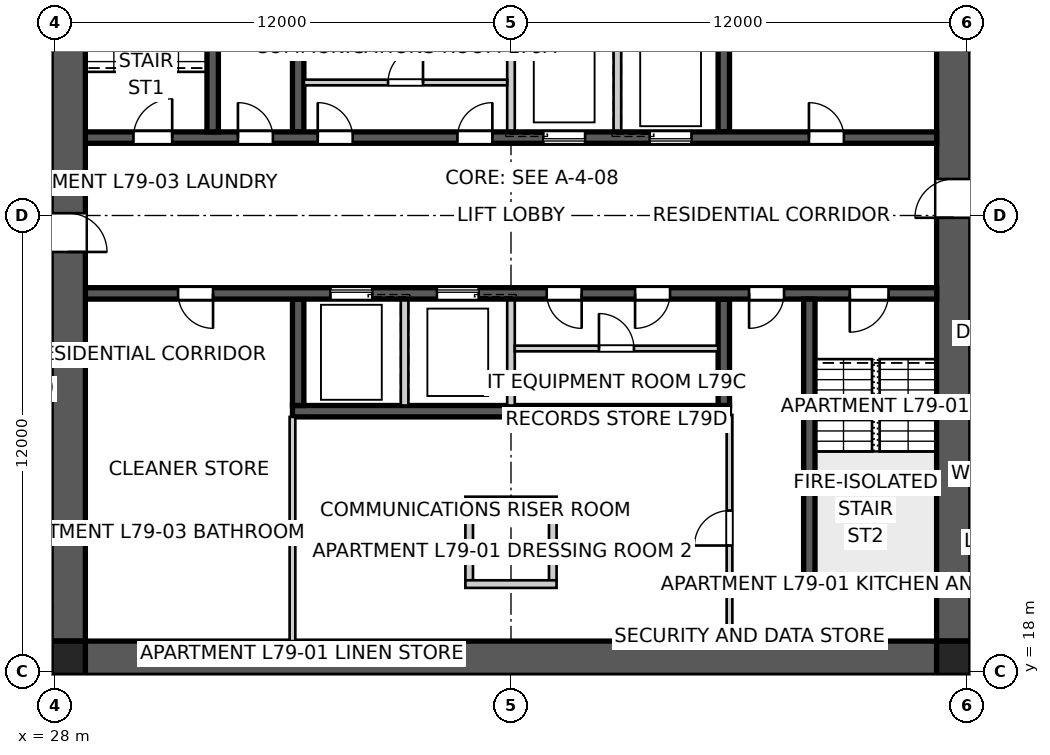
"""IFC4 building model, lengths in metres.
Left out: names, types, materials, properties, quantities, classifications, styles, units other than length and angle.
Written with IfcOpenShell. Run it as: python <this file> out.ifc"""

import sys

from ifc_helpers import new_model, si_unit, direction, frame, frame_2d, origin, origin_2d, place, context, subcontext, project, spatial, polyline, rectangle, outline, extrude, element, fill, save


model = new_model("IFC4")
c1 = context("Model", 3, precision=1e-05, world=origin(), true_north=direction((0.0, 1.0)))
c2 = subcontext(c1, "Body", "Model", "MODEL_VIEW")
j1 = project(units=[si_unit("LENGTHUNIT", "METRE"), si_unit("PLANEANGLEUNIT", "RADIAN")], contexts=[c1])
p1 = place(None, origin())
s1 = spatial("IfcSite", under=j1, at=p1, CompositionType="ELEMENT")
p2 = place(p1, origin())
s2 = spatial("IfcBuilding", under=s1, at=p2, CompositionType="ELEMENT")
p3 = place(p2, frame((0.0, 0.0, 286.2)))
s3 = spatial("IfcBuildingStorey", under=s2, at=p3, CompositionType="ELEMENT", Elevation=286.2)
p4 = place(p3, frame((51.2, 18.35, 0.0), z_axis=(0.0, 0.0, 1.0), x_axis=(-1.0, 0.0, 0.0)))
e1 = element("IfcWall", 1, at=p4, inside=s3, PredefinedType="SHEAR", context=c2, shape_type="SweptSolid", body=[
    extrude(outline(polyline([(0.0, -0.45), (22.4, -0.45), (22.4, -0.025), (22.85, -0.025), (22.85, 0.025), (22.4, 0.025), (22.4, 0.45), (0.0, 0.45), (0.0, 0.025), (-0.45, 0.025), (-0.45, -0.025), (0.0, -0.025), (0.0, -0.45)])), origin(), (0.0, 0.0, 1.0), 3.4),
])
p5 = place(p3, frame((51.65, 18.8, 0.0), z_axis=(0.0, 0.0, 1.0), x_axis=(0.0, 1.0, 0.0)))
e2 = element("IfcWall", 2, at=p5, inside=s3, PredefinedType="SHEAR", context=c2, shape_type="SweptSolid", body=[
    extrude(outline(polyline([(0.0, -0.45), (22.4, -0.45), (22.4, -0.025), (22.85, -0.025), (22.85, 0.025), (22.4, 0.025), (22.4, 0.45), (0.0, 0.45), (0.0, 0.025), (-0.45, 0.025), (-0.45, -0.025), (0.0, -0.025), (0.0, -0.45)])), origin(), (0.0, 0.0, 1.0), 3.4),
])
p6 = place(p5, frame((11.14, 0.0, 0.0)))
e3 = element("IfcOpeningElement", 3, at=p6, cuts=e2, PredefinedType="OPENING", context=c2, shape_type="SweptSolid", body=[
    extrude(rectangle(XDim=1.02, YDim=2.4, at=frame_2d((0.51, 1.2))), frame((0.0, 0.46, 0.0), z_axis=(0.0, -1.0, 0.0), x_axis=(1.0, 0.0, 0.0)), (0.0, 0.0, 1.0), 0.92),
])
p7 = place(p3, frame((28.35, 41.2, 0.0), z_axis=(0.0, 0.0, 1.0), x_axis=(0.0, -1.0, 0.0)))
e4 = element("IfcWall", 4, at=p7, inside=s3, PredefinedType="SHEAR", context=c2, shape_type="SweptSolid", body=[
    extrude(outline(polyline([(0.0, -0.45), (22.4, -0.45), (22.4, -0.025), (22.85, -0.025), (22.85, 0.025), (22.4, 0.025), (22.4, 0.45), (0.0, 0.45), (0.0, 0.025), (-0.45, 0.025), (-0.45, -0.025), (0.0, -0.025), (0.0, -0.45)])), origin(), (0.0, 0.0, 1.0), 3.4),
])
p8 = place(p7, frame((11.14, 0.0, 0.0)))
e5 = element("IfcOpeningElement", 5, at=p8, cuts=e4, PredefinedType="OPENING", context=c2, shape_type="SweptSolid", body=[
    extrude(rectangle(XDim=1.02, YDim=2.4, at=frame_2d((0.51, 1.2))), frame((0.0, 0.46, 0.0), z_axis=(0.0, -1.0, 0.0), x_axis=(1.0, 0.0, 0.0)), (0.0, 0.0, 1.0), 0.92),
])
p9 = place(p3, frame((28.8, 32.05, 0.0), z_axis=(0.0, 0.0, 1.0), x_axis=(1.0, 0.0, 0.0)))
e6 = element("IfcWall", 6, at=p9, inside=s3, PredefinedType="SHEAR", context=c2, shape_type="SweptSolid", body=[
    extrude(rectangle(XDim=22.4, YDim=0.3, at=frame_2d((11.2, 0.0))), origin(), (0.0, 0.0, 1.0), 3.4),
])
p10 = place(p9, frame((19.04, 0.0, 0.0)))
e7 = element("IfcOpeningElement", 7, at=p10, cuts=e6, PredefinedType="OPENING", context=c2, shape_type="SweptSolid", body=[
    extrude(rectangle(XDim=0.92, YDim=2.1, at=frame_2d((0.46, 1.05))), frame((0.0, 0.16, 0.0), z_axis=(0.0, -1.0, 0.0), x_axis=(1.0, 0.0, 0.0)), (0.0, 0.0, 1.0), 0.32),
])
p11 = place(p9, frame((1.265, 0.0, 0.0)))
e8 = element("IfcOpeningElement", 8, at=p11, cuts=e6, PredefinedType="OPENING", context=c2, shape_type="SweptSolid", body=[
    extrude(rectangle(XDim=1.02, YDim=2.1, at=frame_2d((0.51, 1.05))), frame((0.0, 0.16, 0.0), z_axis=(0.0, -1.0, 0.0), x_axis=(1.0, 0.0, 0.0)), (0.0, 0.0, 1.0), 0.32),
])
p12 = place(p9, frame((4.015, 0.0, 0.0)))
e9 = element("IfcOpeningElement", 9, at=p12, cuts=e6, PredefinedType="OPENING", context=c2, shape_type="SweptSolid", body=[
    extrude(rectangle(XDim=0.92, YDim=2.1, at=frame_2d((0.46, 1.05))), frame((0.0, 0.16, 0.0), z_axis=(0.0, -1.0, 0.0), x_axis=(1.0, 0.0, 0.0)), (0.0, 0.0, 1.0), 0.32),
])
p13 = place(p9, frame((6.115, 0.0, 0.0)))
e10 = element("IfcOpeningElement", 10, at=p13, cuts=e6, PredefinedType="OPENING", context=c2, shape_type="SweptSolid", body=[
    extrude(rectangle(XDim=0.92, YDim=2.1, at=frame_2d((0.46, 1.05))), frame((0.0, 0.16, 0.0), z_axis=(0.0, -1.0, 0.0), x_axis=(1.0, 0.0, 0.0)), (0.0, 0.0, 1.0), 0.32),
])
p14 = place(p9, frame((9.79, 0.0, 0.0)))
e11 = element("IfcOpeningElement", 11, at=p14, cuts=e6, PredefinedType="OPENING", context=c2, shape_type="SweptSolid", body=[
    extrude(rectangle(XDim=0.92, YDim=2.1, at=frame_2d((0.46, 1.05))), frame((0.0, 0.16, 0.0), z_axis=(0.0, -1.0, 0.0), x_axis=(1.0, 0.0, 0.0)), (0.0, 0.0, 1.0), 0.32),
])
p15 = place(p9, frame((12.05, 0.0, 0.0)))
e12 = element("IfcOpeningElement", 12, at=p15, cuts=e6, PredefinedType="OPENING", context=c2, shape_type="SweptSolid", body=[
    extrude(rectangle(XDim=1.1, YDim=2.1, at=frame_2d((0.55, 1.05))), frame((0.0, 0.16, 0.0), z_axis=(0.0, -1.0, 0.0), x_axis=(1.0, 0.0, 0.0)), (0.0, 0.0, 1.0), 0.32),
])
p16 = place(p9, frame((14.85, 0.0, 0.0)))
e13 = element("IfcOpeningElement", 13, at=p16, cuts=e6, PredefinedType="OPENING", context=c2, shape_type="SweptSolid", body=[
    extrude(rectangle(XDim=1.1, YDim=2.1, at=frame_2d((0.55, 1.05))), frame((0.0, 0.16, 0.0), z_axis=(0.0, -1.0, 0.0), x_axis=(1.0, 0.0, 0.0)), (0.0, 0.0, 1.0), 0.32),
])
p17 = place(p3, frame((51.2, 27.95, 0.0), z_axis=(0.0, 0.0, 1.0), x_axis=(-1.0, 0.0, 0.0)))
e14 = element("IfcWall", 14, at=p17, inside=s3, PredefinedType="SHEAR", context=c2, shape_type="SweptSolid", body=[
    extrude(rectangle(XDim=22.4, YDim=0.3, at=frame_2d((11.2, 0.0))), origin(), (0.0, 0.0, 1.0), 3.4),
])
p18 = place(p17, frame((19.04, 0.0, 0.0)))
e15 = element("IfcOpeningElement", 15, at=p18, cuts=e14, PredefinedType="OPENING", context=c2, shape_type="SweptSolid", body=[
    extrude(rectangle(XDim=0.92, YDim=2.1, at=frame_2d((0.46, 1.05))), frame((0.0, 0.16, 0.0), z_axis=(0.0, -1.0, 0.0), x_axis=(1.0, 0.0, 0.0)), (0.0, 0.0, 1.0), 0.32),
])
p19 = place(p17, frame((1.265, 0.0, 0.0)))
e16 = element("IfcOpeningElement", 16, at=p19, cuts=e14, PredefinedType="OPENING", context=c2, shape_type="SweptSolid", body=[
    extrude(rectangle(XDim=1.02, YDim=2.1, at=frame_2d((0.51, 1.05))), frame((0.0, 0.16, 0.0), z_axis=(0.0, -1.0, 0.0), x_axis=(1.0, 0.0, 0.0)), (0.0, 0.0, 1.0), 0.32),
])
p20 = place(p17, frame((4.015, 0.0, 0.0)))
e17 = element("IfcOpeningElement", 17, at=p20, cuts=e14, PredefinedType="OPENING", context=c2, shape_type="SweptSolid", body=[
    extrude(rectangle(XDim=0.92, YDim=2.1, at=frame_2d((0.46, 1.05))), frame((0.0, 0.16, 0.0), z_axis=(0.0, -1.0, 0.0), x_axis=(1.0, 0.0, 0.0)), (0.0, 0.0, 1.0), 0.32),
])
p21 = place(p17, frame((9.34, 0.0, 0.0)))
e18 = element("IfcOpeningElement", 18, at=p21, cuts=e14, PredefinedType="OPENING", context=c2, shape_type="SweptSolid", body=[
    extrude(rectangle(XDim=0.92, YDim=2.1, at=frame_2d((0.46, 1.05))), frame((0.0, 0.16, 0.0), z_axis=(0.0, -1.0, 0.0), x_axis=(1.0, 0.0, 0.0)), (0.0, 0.0, 1.0), 0.32),
])
p22 = place(p17, frame((7.015, 0.0, 0.0)))
e19 = element("IfcOpeningElement", 19, at=p22, cuts=e14, PredefinedType="OPENING", context=c2, shape_type="SweptSolid", body=[
    extrude(rectangle(XDim=0.92, YDim=2.1, at=frame_2d((0.46, 1.05))), frame((0.0, 0.16, 0.0), z_axis=(0.0, -1.0, 0.0), x_axis=(1.0, 0.0, 0.0)), (0.0, 0.0, 1.0), 0.32),
])
p23 = place(p17, frame((12.05, 0.0, 0.0)))
e20 = element("IfcOpeningElement", 20, at=p23, cuts=e14, PredefinedType="OPENING", context=c2, shape_type="SweptSolid", body=[
    extrude(rectangle(XDim=1.1, YDim=2.1, at=frame_2d((0.55, 1.05))), frame((0.0, 0.16, 0.0), z_axis=(0.0, -1.0, 0.0), x_axis=(1.0, 0.0, 0.0)), (0.0, 0.0, 1.0), 0.32),
])
p24 = place(p17, frame((14.85, 0.0, 0.0)))
e21 = element("IfcOpeningElement", 21, at=p24, cuts=e14, PredefinedType="OPENING", context=c2, shape_type="SweptSolid", body=[
    extrude(rectangle(XDim=1.1, YDim=2.1, at=frame_2d((0.55, 1.05))), frame((0.0, 0.16, 0.0), z_axis=(0.0, -1.0, 0.0), x_axis=(1.0, 0.0, 0.0)), (0.0, 0.0, 1.0), 0.32),
])
p25 = place(p3, frame((45.75, 24.85, 0.0), z_axis=(0.0, 0.0, 1.0), x_axis=(-1.0, 0.0, 0.0)))
e22 = element("IfcWall", 22, at=p25, inside=s3, PredefinedType="SHEAR", context=c2, shape_type="SweptSolid", body=[
    extrude(rectangle(XDim=11.5, YDim=0.3, at=frame_2d((5.75, 0.0))), origin(), (0.0, 0.0, 1.0), 3.4),
])
for number, where, z_axis, x_axis in (
    (23, (34.4, 32.2, 0.0), (0.0, 0.0, 1.0), (0.0, 1.0, 0.0)),
    (24, (45.6, 27.8, 0.0), (0.0, 0.0, 1.0), (0.0, -1.0, 0.0)),
):
    element("IfcWall", number, at=place(p3, frame(where, z_axis=z_axis, x_axis=x_axis)), inside=s3, PredefinedType="SHEAR", context=c2, shape_type="SweptSolid", body=[
        extrude(rectangle(XDim=2.8, YDim=0.3, at=frame_2d((1.4, 0.0))), origin(), (0.0, 0.0, 1.0), 3.4),
    ])
for number, where, z_axis, x_axis in (
    (25, (40.0, 32.2, 0.0), (0.0, 0.0, 1.0), (0.0, 1.0, 0.0)),
    (26, (40.0, 27.8, 0.0), (0.0, 0.0, 1.0), (0.0, -1.0, 0.0)),
    (27, (42.8, 32.2, 0.0), (0.0, 0.0, 1.0), (0.0, 1.0, 0.0)),
    (28, (37.2, 27.8, 0.0), (0.0, 0.0, 1.0), (0.0, -1.0, 0.0)),
):
    element("IfcWall", number, at=place(p3, frame(where, z_axis=z_axis, x_axis=x_axis)), inside=s3, PredefinedType="SOLIDWALL", context=c2, shape_type="SweptSolid", body=[
        extrude(rectangle(XDim=2.8, YDim=0.2, at=frame_2d((1.4, 0.0))), origin(), (0.0, 0.0, 1.0), 3.4),
    ])
for number, where, z_axis, x_axis in (
    (29, (45.6, 32.2, 0.0), (0.0, 0.0, 1.0), (0.0, 1.0, 0.0)),
    (30, (34.4, 27.8, 0.0), (0.0, 0.0, 1.0), (0.0, -1.0, 0.0)),
):
    element("IfcWall", number, at=place(p3, frame(where, z_axis=z_axis, x_axis=x_axis)), inside=s3, PredefinedType="SHEAR", context=c2, shape_type="SweptSolid", body=[
        extrude(rectangle(XDim=2.8, YDim=0.3, at=frame_2d((1.4, 0.0))), origin(), (0.0, 0.0, 1.0), 3.4),
    ])
for number, where, z_axis, x_axis in (
    (31, (32.15, 32.2, 0.0), (0.0, 0.0, 1.0), (0.0, 1.0, 0.0)),
    (32, (47.85, 27.8, 0.0), (0.0, 0.0, 1.0), (0.0, -1.0, 0.0)),
):
    element("IfcWall", number, at=place(p3, frame(where, z_axis=z_axis, x_axis=x_axis)), inside=s3, PredefinedType="SHEAR", context=c2, shape_type="SweptSolid", body=[
        extrude(rectangle(XDim=7.7, YDim=0.3, at=frame_2d((3.85, 0.0))), origin(), (0.0, 0.0, 1.0), 3.4),
    ])
p26 = place(p3, frame((51.2, 20.25, 0.0), z_axis=(0.0, 0.0, 1.0), x_axis=(-1.0, 0.0, 0.0)))
e33 = element("IfcWall", 33, at=p26, inside=s3, PredefinedType="SHEAR", context=c2, shape_type="SweptSolid", body=[
    extrude(rectangle(XDim=3.5, YDim=0.3, at=frame_2d((1.75, 0.0))), origin(), (0.0, 0.0, 1.0), 3.4),
])
for number, where, z_axis, x_axis in (
    (34, (38.9, 22.4, 0.0), (0.0, 0.0, 1.0), (0.0, -1.0, 0.0)),
    (35, (41.1, 22.4, 0.0), (0.0, 0.0, 1.0), (0.0, -1.0, 0.0)),
):
    element("IfcWall", number, at=place(p3, frame(where, z_axis=z_axis, x_axis=x_axis)), inside=s3, PredefinedType="SOLIDWALL", context=c2, shape_type="SweptSolid", body=[
        extrude(rectangle(XDim=2.0, YDim=0.2, at=frame_2d((1.0, 0.0))), origin(), (0.0, 0.0, 1.0), 3.4),
    ])
for number, where, z_axis, x_axis in (
    (36, (38.8, 22.5, 0.0), (0.0, 0.0, 1.0), (1.0, 0.0, 0.0)),
    (37, (38.8, 20.3, 0.0), (0.0, 0.0, 1.0), (1.0, 0.0, 0.0)),
):
    element("IfcWall", number, at=place(p3, frame(where, z_axis=z_axis, x_axis=x_axis)), inside=s3, PredefinedType="SOLIDWALL", context=c2, shape_type="SweptSolid", body=[
        extrude(rectangle(XDim=2.4, YDim=0.2, at=frame_2d((1.2, 0.0))), origin(), (0.0, 0.0, 1.0), 3.4),
    ])
for number, where, z_axis, x_axis in (
    (38, (28.35, 18.35, 0.0), (0.0, 0.0, 1.0), (1.0, 0.0, 0.0)),
    (39, (51.65, 18.35, 0.0), (0.0, 0.0, 1.0), (1.0, 0.0, 0.0)),
):
    element("IfcColumn", number, at=place(p3, frame(where, z_axis=z_axis, x_axis=x_axis)), inside=s3, PredefinedType="COLUMN", context=c2, shape_type="SweptSolid", body=[
        extrude(rectangle(XDim=0.9, YDim=0.9, at=origin_2d()), origin(), (0.0, 0.0, 1.0), 3.4),
    ])
p27 = place(p3, frame((24.296, 16.823, 0.0), z_axis=(0.0, 0.0, 1.0), x_axis=(0.76603440109, 0.64279957712, 0.0)))
e40 = element("IfcWall", 40, at=p27, inside=s3, PredefinedType="PARTITIONING", context=c2, shape_type="SweptSolid", body=[
    extrude(rectangle(XDim=4.64, YDim=0.25, at=frame_2d((2.32, 0.0))), origin(), (0.0, 0.0, 1.0), 3.25),
])
p28 = place(p3, frame((45.75, 18.8, 0.0), z_axis=(0.0, 0.0, 1.0), x_axis=(0.0, 1.0, 0.0)))
e41 = element("IfcWall", 41, at=p28, inside=s3, PredefinedType="SOLIDWALL", context=c2, shape_type="SweptSolid", body=[
    extrude(rectangle(XDim=5.95, YDim=0.15, at=frame_2d((2.975, 0.0))), origin(), (0.0, 0.0, 1.0), 3.25),
])
p29 = place(p28, frame((2.515, 0.0, 0.0)))
e42 = element("IfcOpeningElement", 42, at=p29, cuts=e41, PredefinedType="OPENING", context=c2, shape_type="SweptSolid", body=[
    extrude(rectangle(XDim=0.92, YDim=2.1, at=frame_2d((0.46, 1.05))), frame((0.0, 0.085, 0.0), z_axis=(0.0, -1.0, 0.0), x_axis=(1.0, 0.0, 0.0)), (0.0, 0.0, 1.0), 0.17),
])
p30 = place(p3, frame((34.25, 18.8, 0.0), z_axis=(0.0, 0.0, 1.0), x_axis=(0.0, 1.0, 0.0)))
e43 = element("IfcWall", 43, at=p30, inside=s3, PredefinedType="SOLIDWALL", context=c2, shape_type="SweptSolid", body=[
    extrude(rectangle(XDim=5.9, YDim=0.15, at=frame_2d((2.95, 0.0))), origin(), (0.0, 0.0, 1.0), 3.25),
])
p31 = place(p3, frame((51.625, 17.9, 0.0), z_axis=(0.0, 0.0, 1.0), x_axis=(0.027925096799, 0.999610018442, 0.0)))
e44 = element("IfcWall", 44, at=p31, inside=s3, PredefinedType="SOLIDWALL", context=c2, shape_type="SweptSolid", body=[
    extrude(rectangle(XDim=0.9, YDim=0.15, at=frame_2d((0.45, 0.0))), origin(), (0.0, 0.0, 1.0), 3.25),
])
p32 = place(p3, frame((34.55, 33.5, 0.0), z_axis=(0.0, 0.0, 1.0), x_axis=(1.0, 0.0, 0.0)))
e45 = element("IfcWall", 45, at=p32, inside=s3, PredefinedType="SOLIDWALL", context=c2, shape_type="SweptSolid", body=[
    extrude(rectangle(XDim=5.35, YDim=0.15, at=frame_2d((2.675, 0.0))), origin(), (0.0, 0.0, 1.0), 3.25),
])
p33 = place(p32, frame((2.215, 0.0, 0.0)))
e46 = element("IfcOpeningElement", 46, at=p33, cuts=e45, PredefinedType="OPENING", context=c2, shape_type="SweptSolid", body=[
    extrude(rectangle(XDim=0.92, YDim=2.1, at=frame_2d((0.46, 1.05))), frame((0.0, 0.085, 0.0), z_axis=(0.0, -1.0, 0.0), x_axis=(1.0, 0.0, 0.0)), (0.0, 0.0, 1.0), 0.17),
])
p34 = place(p3, frame((40.1, 26.5, 0.0), z_axis=(0.0, 0.0, 1.0), x_axis=(1.0, 0.0, 0.0)))
e47 = element("IfcWall", 47, at=p34, inside=s3, PredefinedType="SOLIDWALL", context=c2, shape_type="SweptSolid", body=[
    extrude(rectangle(XDim=5.35, YDim=0.15, at=frame_2d((2.675, 0.0))), origin(), (0.0, 0.0, 1.0), 3.25),
])
p35 = place(p34, frame((2.215, 0.0, 0.0)))
e48 = element("IfcOpeningElement", 48, at=p35, cuts=e47, PredefinedType="OPENING", context=c2, shape_type="SweptSolid", body=[
    extrude(rectangle(XDim=0.92, YDim=2.1, at=frame_2d((0.46, 1.05))), frame((0.0, 0.085, 0.0), z_axis=(0.0, -1.0, 0.0), x_axis=(1.0, 0.0, 0.0)), (0.0, 0.0, 1.0), 0.17),
])
p36 = place(p10, origin())
e49 = element("IfcDoor", 49, at=p36, inside=s3, OperationType="SINGLE_SWING_LEFT", PredefinedType="DOOR", context=c2, shape_type="SweptSolid", body=[
    extrude(rectangle(XDim=0.92, YDim=2.1, at=frame_2d((0.46, 1.05))), frame((0.0, 0.025, 0.0), z_axis=(0.0, -1.0, 0.0), x_axis=(1.0, 0.0, 0.0)), (0.0, 0.0, 1.0), 0.05),
])
fill(e7, e49)
p37 = place(p18, origin())
e50 = element("IfcDoor", 50, at=p37, inside=s3, OperationType="SINGLE_SWING_LEFT", PredefinedType="DOOR", context=c2, shape_type="SweptSolid", body=[
    extrude(rectangle(XDim=0.92, YDim=2.1, at=frame_2d((0.46, 1.05))), frame((0.0, 0.025, 0.0), z_axis=(0.0, -1.0, 0.0), x_axis=(1.0, 0.0, 0.0)), (0.0, 0.0, 1.0), 0.05),
])
fill(e15, e50)
p38 = place(p19, origin())
e51 = element("IfcDoor", 51, at=p38, inside=s3, OperationType="SINGLE_SWING_RIGHT", PredefinedType="DOOR", context=c2, shape_type="SweptSolid", body=[
    extrude(rectangle(XDim=1.02, YDim=2.1, at=frame_2d((0.51, 1.05))), frame((0.0, 0.025, 0.0), z_axis=(0.0, -1.0, 0.0), x_axis=(1.0, 0.0, 0.0)), (0.0, 0.0, 1.0), 0.05),
])
fill(e16, e51)
p39 = place(p11, origin())
e52 = element("IfcDoor", 52, at=p39, inside=s3, OperationType="SINGLE_SWING_RIGHT", PredefinedType="DOOR", context=c2, shape_type="SweptSolid", body=[
    extrude(rectangle(XDim=1.02, YDim=2.1, at=frame_2d((0.51, 1.05))), frame((0.0, 0.025, 0.0), z_axis=(0.0, -1.0, 0.0), x_axis=(1.0, 0.0, 0.0)), (0.0, 0.0, 1.0), 0.05),
])
fill(e8, e52)
p40 = place(p12, origin())
e53 = element("IfcDoor", 53, at=p40, inside=s3, OperationType="SINGLE_SWING_LEFT", PredefinedType="DOOR", context=c2, shape_type="SweptSolid", body=[
    extrude(rectangle(XDim=0.92, YDim=2.1, at=frame_2d((0.46, 1.05))), frame((0.0, 0.025, 0.0), z_axis=(0.0, -1.0, 0.0), x_axis=(1.0, 0.0, 0.0)), (0.0, 0.0, 1.0), 0.05),
])
fill(e9, e53)
p41 = place(p20, origin())
e54 = element("IfcDoor", 54, at=p41, inside=s3, OperationType="SINGLE_SWING_RIGHT", PredefinedType="DOOR", context=c2, shape_type="SweptSolid", body=[
    extrude(rectangle(XDim=0.92, YDim=2.1, at=frame_2d((0.46, 1.05))), frame((0.0, 0.025, 0.0), z_axis=(0.0, -1.0, 0.0), x_axis=(1.0, 0.0, 0.0)), (0.0, 0.0, 1.0), 0.05),
])
fill(e17, e54)
p42 = place(p29, origin())
e55 = element("IfcDoor", 55, at=p42, inside=s3, OperationType="SINGLE_SWING_LEFT", PredefinedType="DOOR", context=c2, shape_type="SweptSolid", body=[
    extrude(rectangle(XDim=0.92, YDim=2.1, at=frame_2d((0.46, 1.05))), frame((0.0, 0.025, 0.0), z_axis=(0.0, -1.0, 0.0), x_axis=(1.0, 0.0, 0.0)), (0.0, 0.0, 1.0), 0.05),
])
fill(e42, e55)
p43 = place(p13, origin())
e56 = element("IfcDoor", 56, at=p43, inside=s3, OperationType="SINGLE_SWING_LEFT", PredefinedType="DOOR", context=c2, shape_type="SweptSolid", body=[
    extrude(rectangle(XDim=0.92, YDim=2.1, at=frame_2d((0.46, 1.05))), frame((0.0, 0.025, 0.0), z_axis=(0.0, -1.0, 0.0), x_axis=(1.0, 0.0, 0.0)), (0.0, 0.0, 1.0), 0.05),
])
fill(e10, e56)
p44 = place(p14, origin())
e57 = element("IfcDoor", 57, at=p44, inside=s3, OperationType="SINGLE_SWING_RIGHT", PredefinedType="DOOR", context=c2, shape_type="SweptSolid", body=[
    extrude(rectangle(XDim=0.92, YDim=2.1, at=frame_2d((0.46, 1.05))), frame((0.0, 0.025, 0.0), z_axis=(0.0, -1.0, 0.0), x_axis=(1.0, 0.0, 0.0)), (0.0, 0.0, 1.0), 0.05),
])
fill(e11, e57)
p45 = place(p33, origin())
e58 = element("IfcDoor", 58, at=p45, inside=s3, OperationType="SINGLE_SWING_RIGHT", PredefinedType="DOOR", context=c2, shape_type="SweptSolid", body=[
    extrude(rectangle(XDim=0.92, YDim=2.1, at=frame_2d((0.46, 1.05))), frame((0.0, 0.025, 0.0), z_axis=(0.0, -1.0, 0.0), x_axis=(1.0, 0.0, 0.0)), (0.0, 0.0, 1.0), 0.05),
])
fill(e46, e58)
p46 = place(p21, origin())
e59 = element("IfcDoor", 59, at=p46, inside=s3, OperationType="SINGLE_SWING_LEFT", PredefinedType="DOOR", context=c2, shape_type="SweptSolid", body=[
    extrude(rectangle(XDim=0.92, YDim=2.1, at=frame_2d((0.46, 1.05))), frame((0.0, 0.025, 0.0), z_axis=(0.0, -1.0, 0.0), x_axis=(1.0, 0.0, 0.0)), (0.0, 0.0, 1.0), 0.05),
])
fill(e18, e59)
p47 = place(p22, origin())
e60 = element("IfcDoor", 60, at=p47, inside=s3, OperationType="SINGLE_SWING_RIGHT", PredefinedType="DOOR", context=c2, shape_type="SweptSolid", body=[
    extrude(rectangle(XDim=0.92, YDim=2.1, at=frame_2d((0.46, 1.05))), frame((0.0, 0.025, 0.0), z_axis=(0.0, -1.0, 0.0), x_axis=(1.0, 0.0, 0.0)), (0.0, 0.0, 1.0), 0.05),
])
fill(e19, e60)
p48 = place(p35, origin())
e61 = element("IfcDoor", 61, at=p48, inside=s3, OperationType="SINGLE_SWING_LEFT", PredefinedType="DOOR", context=c2, shape_type="SweptSolid", body=[
    extrude(rectangle(XDim=0.92, YDim=2.1, at=frame_2d((0.46, 1.05))), frame((0.0, 0.025, 0.0), z_axis=(0.0, -1.0, 0.0), x_axis=(1.0, 0.0, 0.0)), (0.0, 0.0, 1.0), 0.05),
])
fill(e48, e61)
p49 = place(p6, origin())
e62 = element("IfcDoor", 62, at=p49, inside=s3, OperationType="SINGLE_SWING_LEFT", PredefinedType="DOOR", context=c2, shape_type="SweptSolid", body=[
    extrude(rectangle(XDim=1.02, YDim=2.4, at=frame_2d((0.51, 1.2))), frame((0.0, 0.025, 0.0), z_axis=(0.0, -1.0, 0.0), x_axis=(1.0, 0.0, 0.0)), (0.0, 0.0, 1.0), 0.05),
])
fill(e3, e62)
p50 = place(p8, origin())
e63 = element("IfcDoor", 63, at=p50, inside=s3, OperationType="SINGLE_SWING_RIGHT", PredefinedType="DOOR", context=c2, shape_type="SweptSolid", body=[
    extrude(rectangle(XDim=1.02, YDim=2.4, at=frame_2d((0.51, 1.2))), frame((0.0, 0.025, 0.0), z_axis=(0.0, -1.0, 0.0), x_axis=(1.0, 0.0, 0.0)), (0.0, 0.0, 1.0), 0.05),
])
fill(e5, e63)
p51 = place(p15, origin())
e64 = element("IfcDoor", 64, at=p51, inside=s3, OperationType="SLIDING_TO_LEFT", PredefinedType="DOOR", context=c2, shape_type="SweptSolid", body=[
    extrude(rectangle(XDim=1.1, YDim=2.1, at=frame_2d((0.55, 1.05))), frame((0.0, 0.025, 0.0), z_axis=(0.0, -1.0, 0.0), x_axis=(1.0, 0.0, 0.0)), (0.0, 0.0, 1.0), 0.05),
])
fill(e12, e64)
p52 = place(p23, origin())
e65 = element("IfcDoor", 65, at=p52, inside=s3, OperationType="SLIDING_TO_LEFT", PredefinedType="DOOR", context=c2, shape_type="SweptSolid", body=[
    extrude(rectangle(XDim=1.1, YDim=2.1, at=frame_2d((0.55, 1.05))), frame((0.0, 0.025, 0.0), z_axis=(0.0, -1.0, 0.0), x_axis=(1.0, 0.0, 0.0)), (0.0, 0.0, 1.0), 0.05),
])
fill(e20, e65)
p53 = place(p16, origin())
e66 = element("IfcDoor", 66, at=p53, inside=s3, OperationType="SLIDING_TO_LEFT", PredefinedType="DOOR", context=c2, shape_type="SweptSolid", body=[
    extrude(rectangle(XDim=1.1, YDim=2.1, at=frame_2d((0.55, 1.05))), frame((0.0, 0.025, 0.0), z_axis=(0.0, -1.0, 0.0), x_axis=(1.0, 0.0, 0.0)), (0.0, 0.0, 1.0), 0.05),
])
fill(e13, e66)
p54 = place(p24, origin())
e67 = element("IfcDoor", 67, at=p54, inside=s3, OperationType="SLIDING_TO_LEFT", PredefinedType="DOOR", context=c2, shape_type="SweptSolid", body=[
    extrude(rectangle(XDim=1.1, YDim=2.1, at=frame_2d((0.55, 1.05))), frame((0.0, 0.025, 0.0), z_axis=(0.0, -1.0, 0.0), x_axis=(1.0, 0.0, 0.0)), (0.0, 0.0, 1.0), 0.05),
])
fill(e21, e67)
save(model, sys.argv[1])
